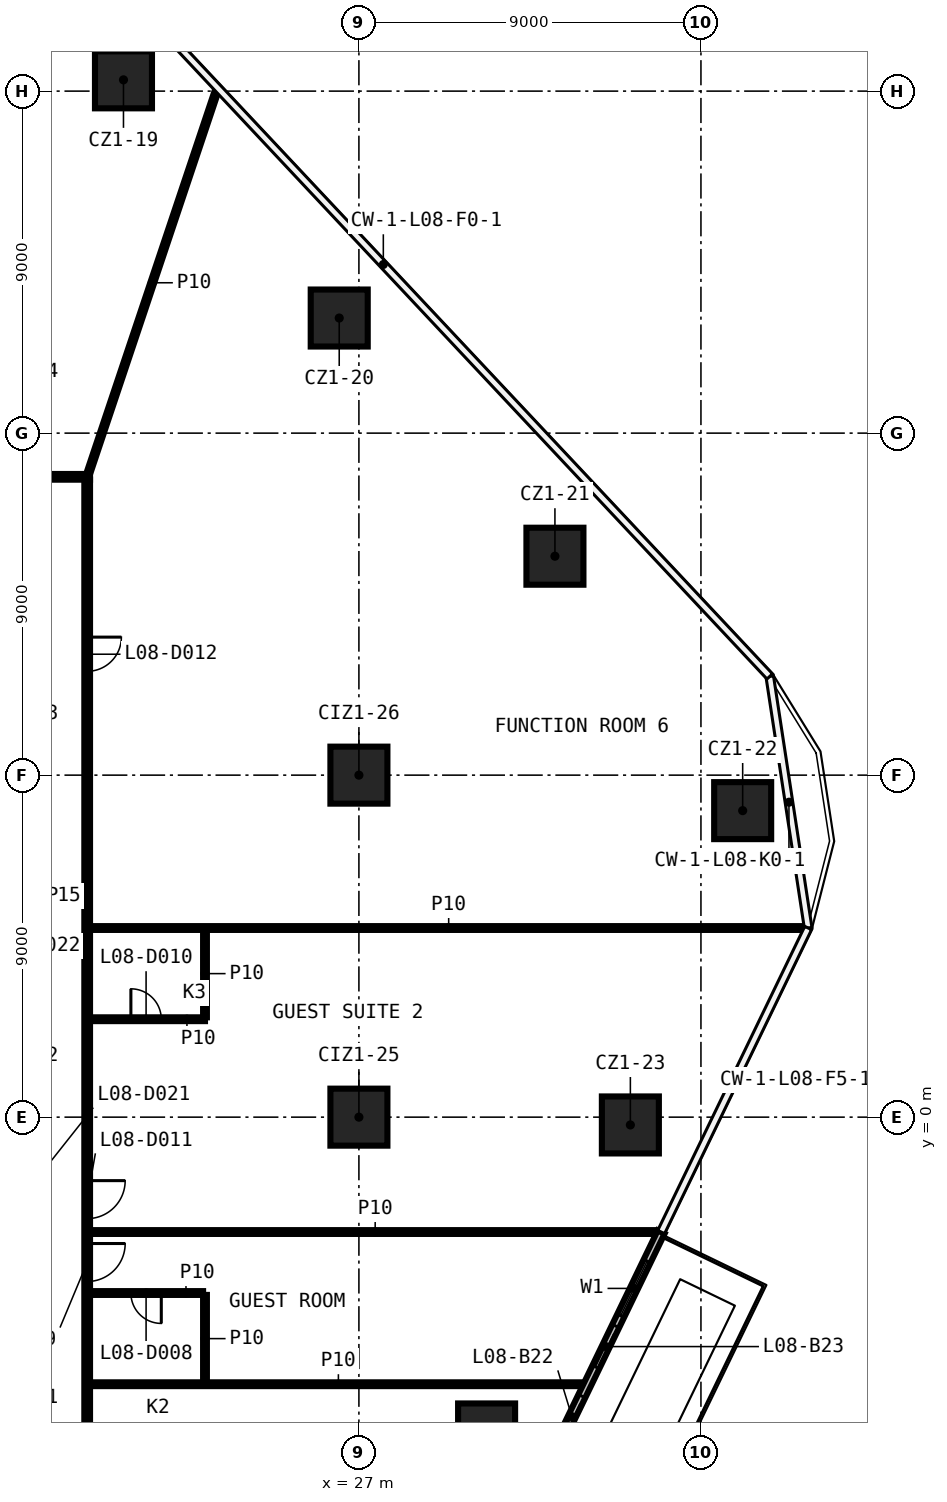
"""IFC4 building model, lengths in metres.
Left out: names, types, materials, properties, quantities, classifications, styles, units other than length and angle.
Written with IfcOpenShell. Run it as: python <this file> out.ifc"""

import sys

from ifc_helpers import new_model, si_unit, direction, frame, frame_2d, origin, origin_2d, place, context, subcontext, project, spatial, rectangle, extrude, element, fill, save


model = new_model("IFC4")
c1 = context("Model", 3, precision=1e-05, world=origin(), true_north=direction((0.0, 1.0)))
c2 = subcontext(c1, "Body", "Model", "MODEL_VIEW")
j1 = project(units=[si_unit("LENGTHUNIT", "METRE"), si_unit("PLANEANGLEUNIT", "RADIAN")], contexts=[c1])
p1 = place(None, origin())
s1 = spatial("IfcSite", under=j1, at=p1, CompositionType="ELEMENT")
p2 = place(p1, origin())
s2 = spatial("IfcBuilding", under=s1, at=p2, CompositionType="ELEMENT")
p3 = place(p2, frame((0.0, 0.0, 51.4)))
s3 = spatial("IfcBuildingStorey", under=s2, at=p3, CompositionType="ELEMENT", Elevation=51.4)
for number, where, z_axis, x_axis in (
    (1, (20.805, 27.297, 0.0), (0.0, 0.0, 1.0), (1.0, 0.0, 0.0)),
    (2, (26.482, 21.029, 0.0), (0.0, 0.0, 1.0), (1.0, 0.0, 0.0)),
    (3, (32.158, 14.761, 0.0), (0.0, 0.0, 1.0), (1.0, 0.0, 0.0)),
    (4, (37.098, 8.066, 0.0), (0.0, 0.0, 1.0), (1.0, 0.0, 0.0)),
    (5, (34.143, -0.205, 0.0), (0.0, 0.0, 1.0), (1.0, 0.0, 0.0)),
    (6, (30.36, -8.284, 0.0), (0.0, 0.0, 1.0), (1.0, 0.0, 0.0)),
    (7, (27.0, 0.0, 0.0), (0.0, 0.0, 1.0), (1.0, 0.0, 0.0)),
    (8, (27.0, 9.0, 0.0), (0.0, 0.0, 1.0), (1.0, 0.0, 0.0)),
):
    element("IfcColumn", number, at=place(p3, frame(where, z_axis=z_axis, x_axis=x_axis)), inside=s3, PredefinedType="COLUMN", context=c2, shape_type="SweptSolid", body=[
        extrude(rectangle(XDim=1.5, YDim=1.5, at=origin_2d()), origin(), (0.0, 0.0, 1.0), 3.3),
    ])
p4 = place(p3, frame((19.925, -7.028, 0.0), z_axis=(0.0, 0.0, 1.0), x_axis=(1.0, 0.0, 0.0)))
e9 = element("IfcWall", 9, at=p4, inside=s3, PredefinedType="PARTITIONING", context=c2, shape_type="SweptSolid", body=[
    extrude(rectangle(XDim=13.071, YDim=0.1, at=frame_2d((6.535, 0.0))), origin(), (0.0, 0.0, 1.0), 3.3),
])
p5 = place(p3, frame((22.9, -4.628, 0.0), z_axis=(0.0, 0.0, 1.0), x_axis=(-1.0, 0.0, 0.0)))
e10 = element("IfcWall", 10, at=p5, inside=s3, PredefinedType="PARTITIONING", context=c2, shape_type="SweptSolid", body=[
    extrude(rectangle(XDim=2.975, YDim=0.1, at=frame_2d((1.487, 0.0))), origin(), (0.0, 0.0, 1.0), 3.3),
])
p6 = place(p5, frame((1.1, 0.0, 0.0)))
e11 = element("IfcOpeningElement", 11, at=p6, cuts=e10, PredefinedType="OPENING", context=c2, shape_type="SweptSolid", body=[
    extrude(rectangle(XDim=0.8, YDim=2.1, at=frame_2d((0.4, 1.05))), frame((0.0, 0.06, 0.0), z_axis=(0.0, -1.0, 0.0), x_axis=(1.0, 0.0, 0.0)), (0.0, 0.0, 1.0), 0.12),
])
p7 = place(p3, frame((19.925, -3.023, 0.0), z_axis=(0.0, 0.0, 1.0), x_axis=(1.0, 0.0, 0.0)))
e12 = element("IfcWall", 12, at=p7, inside=s3, PredefinedType="PARTITIONING", context=c2, shape_type="SweptSolid", body=[
    extrude(rectangle(XDim=15.006, YDim=0.1, at=frame_2d((7.503, 0.0))), origin(), (0.0, 0.0, 1.0), 3.3),
])
p8 = place(p3, frame((19.925, 2.577, 0.0), z_axis=(0.0, 0.0, 1.0), x_axis=(1.0, 0.0, 0.0)))
e13 = element("IfcWall", 13, at=p8, inside=s3, PredefinedType="PARTITIONING", context=c2, shape_type="SweptSolid", body=[
    extrude(rectangle(XDim=3.025, YDim=0.1, at=frame_2d((1.512, 0.0))), origin(), (0.0, 0.0, 1.0), 3.3),
])
p9 = place(p8, frame((1.075, 0.0, 0.0)))
e14 = element("IfcOpeningElement", 14, at=p9, cuts=e13, PredefinedType="OPENING", context=c2, shape_type="SweptSolid", body=[
    extrude(rectangle(XDim=0.8, YDim=2.1, at=frame_2d((0.4, 1.05))), frame((0.0, 0.06, 0.0), z_axis=(0.0, -1.0, 0.0), x_axis=(1.0, 0.0, 0.0)), (0.0, 0.0, 1.0), 0.12),
])
p10 = place(p3, frame((19.925, 4.977, 0.0), z_axis=(0.0, 0.0, 1.0), x_axis=(1.0, 0.0, 0.0)))
e15 = element("IfcWall", 15, at=p10, inside=s3, PredefinedType="PARTITIONING", context=c2, shape_type="SweptSolid", body=[
    extrude(rectangle(XDim=18.874, YDim=0.1, at=frame_2d((9.437, 0.0))), origin(), (0.0, 0.0, 1.0), 3.3),
])
p11 = place(p3, frame((-19.925, 16.85, 0.0), z_axis=(0.0, 0.0, 1.0), x_axis=(1.0, 0.0, 0.0)))
e16 = element("IfcWall", 16, at=p11, inside=s3, PredefinedType="PARTITIONING", context=c2, shape_type="SweptSolid", body=[
    extrude(rectangle(XDim=39.85, YDim=0.15, at=frame_2d((19.925, 0.0))), origin(), (0.0, 0.0, 1.0), 3.3),
])
p12 = place(p11, frame((31.643, 0.0, 0.0)))
e17 = element("IfcOpeningElement", 17, at=p12, cuts=e16, PredefinedType="OPENING", context=c2, shape_type="SweptSolid", body=[
    extrude(rectangle(XDim=0.9, YDim=2.1, at=frame_2d((0.45, 1.05))), frame((0.0, 0.085, 0.0), z_axis=(0.0, -1.0, 0.0), x_axis=(1.0, 0.0, 0.0)), (0.0, 0.0, 1.0), 0.17),
])
p13 = place(p11, frame((22.056, 0.0, 0.0)))
e18 = element("IfcOpeningElement", 18, at=p13, cuts=e16, PredefinedType="OPENING", context=c2, shape_type="SweptSolid", body=[
    extrude(rectangle(XDim=0.9, YDim=2.1, at=frame_2d((0.45, 1.05))), frame((0.0, 0.085, 0.0), z_axis=(0.0, -1.0, 0.0), x_axis=(1.0, 0.0, 0.0)), (0.0, 0.0, 1.0), 0.17),
])
p14 = place(p11, frame((14.831, 0.0, 0.0)))
e19 = element("IfcOpeningElement", 19, at=p14, cuts=e16, PredefinedType="OPENING", context=c2, shape_type="SweptSolid", body=[
    extrude(rectangle(XDim=1.0, YDim=2.1, at=frame_2d((0.5, 1.05))), frame((0.0, 0.085, 0.0), z_axis=(0.0, -1.0, 0.0), x_axis=(1.0, 0.0, 0.0)), (0.0, 0.0, 1.0), 0.17),
])
p15 = place(p3, frame((19.85, 16.85, 0.0), z_axis=(0.0, 0.0, 1.0), x_axis=(0.317967659794, 0.948101559605, 0.0)))
e20 = element("IfcWall", 20, at=p15, inside=s3, PredefinedType="PARTITIONING", context=c2, shape_type="SweptSolid", body=[
    extrude(rectangle(XDim=10.773, YDim=0.1, at=frame_2d((5.387, 0.0))), origin(), (0.0, 0.0, 1.0), 3.3),
])
p16 = place(p3, frame((22.95, -6.978, 0.0), z_axis=(0.0, 0.0, 1.0), x_axis=(0.0, 1.0, 0.0)))
e21 = element("IfcWall", 21, at=p16, inside=s3, PredefinedType="PARTITIONING", context=c2, shape_type="SweptSolid", body=[
    extrude(rectangle(XDim=2.3, YDim=0.1, at=frame_2d((1.15, 0.0))), origin(), (0.0, 0.0, 1.0), 3.3),
])
p17 = place(p3, frame((22.95, 2.627, 0.0), z_axis=(0.0, 0.0, 1.0), x_axis=(0.0, 1.0, 0.0)))
e22 = element("IfcWall", 22, at=p17, inside=s3, PredefinedType="PARTITIONING", context=c2, shape_type="SweptSolid", body=[
    extrude(rectangle(XDim=2.3, YDim=0.1, at=frame_2d((1.15, 0.0))), origin(), (0.0, 0.0, 1.0), 3.3),
])
p18 = place(p3, frame((19.85, 16.775, 0.0), z_axis=(0.0, 0.0, 1.0), x_axis=(0.0, -1.0, 0.0)))
e23 = element("IfcWall", 23, at=p18, inside=s3, PredefinedType="PARTITIONING", context=c2, shape_type="SweptSolid", body=[
    extrude(rectangle(XDim=33.55, YDim=0.15, at=frame_2d((16.775, 0.0))), origin(), (0.0, 0.0, 1.0), 3.3),
])
p19 = place(p18, frame((29.016, 0.0, 0.0)))
e24 = element("IfcOpeningElement", 24, at=p19, cuts=e23, PredefinedType="OPENING", context=c2, shape_type="SweptSolid", body=[
    extrude(rectangle(XDim=1.0, YDim=2.1, at=frame_2d((0.5, 1.05))), frame((0.0, 0.085, 0.0), z_axis=(0.0, -1.0, 0.0), x_axis=(1.0, 0.0, 0.0)), (0.0, 0.0, 1.0), 0.17),
])
p20 = place(p18, frame((20.1, 0.0, 0.0)))
e25 = element("IfcOpeningElement", 25, at=p20, cuts=e23, PredefinedType="OPENING", context=c2, shape_type="SweptSolid", body=[
    extrude(rectangle(XDim=1.0, YDim=2.1, at=frame_2d((0.5, 1.05))), frame((0.0, 0.085, 0.0), z_axis=(0.0, -1.0, 0.0), x_axis=(1.0, 0.0, 0.0)), (0.0, 0.0, 1.0), 0.17),
])
p21 = place(p18, frame((18.446, 0.0, 0.0)))
e26 = element("IfcOpeningElement", 26, at=p21, cuts=e23, PredefinedType="OPENING", context=c2, shape_type="SweptSolid", body=[
    extrude(rectangle(XDim=1.0, YDim=2.1, at=frame_2d((0.5, 1.05))), frame((0.0, 0.085, 0.0), z_axis=(0.0, -1.0, 0.0), x_axis=(1.0, 0.0, 0.0)), (0.0, 0.0, 1.0), 0.17),
])
p22 = place(p18, frame((4.143, 0.0, 0.0)))
e27 = element("IfcOpeningElement", 27, at=p22, cuts=e23, PredefinedType="OPENING", context=c2, shape_type="SweptSolid", body=[
    extrude(rectangle(XDim=0.9, YDim=2.1, at=frame_2d((0.45, 1.05))), frame((0.0, 0.085, 0.0), z_axis=(0.0, -1.0, 0.0), x_axis=(1.0, 0.0, 0.0)), (0.0, 0.0, 1.0), 0.17),
])
p23 = place(p3, frame((23.338, -27.051, 0.0), z_axis=(0.0, 0.0, 1.0), x_axis=(0.43524886879, 0.900310181114, 0.0)))
e28 = element("IfcWall", 28, at=p23, inside=s3, PredefinedType="SOLIDWALL", context=c2, shape_type="SweptSolid", body=[
    extrude(rectangle(XDim=26.689, YDim=0.2, at=frame_2d((13.344, 0.0))), origin(), (0.0, 0.0, 1.0), 3.3),
])
p24 = place(p23, frame((0.5, 0.0, 0.6)))
e29 = element("IfcOpeningElement", 29, at=p24, cuts=e28, PredefinedType="OPENING", context=c2, shape_type="SweptSolid", body=[
    extrude(rectangle(XDim=1.6, YDim=2.4, at=frame_2d((0.8, 1.2))), frame((0.0, 0.11, 0.0), z_axis=(0.0, -1.0, 0.0), x_axis=(1.0, 0.0, 0.0)), (0.0, 0.0, 1.0), 0.22),
])
p25 = place(p23, frame((3.0, 0.0, 0.0)))
e30 = element("IfcOpeningElement", 30, at=p25, cuts=e28, PredefinedType="OPENING", context=c2, shape_type="SweptSolid", body=[
    extrude(rectangle(XDim=1.2, YDim=2.4, at=frame_2d((0.6, 1.2))), frame((0.0, 0.11, 0.0), z_axis=(0.0, -1.0, 0.0), x_axis=(1.0, 0.0, 0.0)), (0.0, 0.0, 1.0), 0.22),
])
p26 = place(p23, frame((6.448, 0.0, 0.6)))
e31 = element("IfcOpeningElement", 31, at=p26, cuts=e28, PredefinedType="OPENING", context=c2, shape_type="SweptSolid", body=[
    extrude(rectangle(XDim=1.6, YDim=2.4, at=frame_2d((0.8, 1.2))), frame((0.0, 0.11, 0.0), z_axis=(0.0, -1.0, 0.0), x_axis=(1.0, 0.0, 0.0)), (0.0, 0.0, 1.0), 0.22),
])
p27 = place(p23, frame((4.948, 0.0, 0.0)))
e32 = element("IfcOpeningElement", 32, at=p27, cuts=e28, PredefinedType="OPENING", context=c2, shape_type="SweptSolid", body=[
    extrude(rectangle(XDim=1.2, YDim=2.4, at=frame_2d((0.6, 1.2))), frame((0.0, 0.11, 0.0), z_axis=(0.0, -1.0, 0.0), x_axis=(1.0, 0.0, 0.0)), (0.0, 0.0, 1.0), 0.22),
])
p28 = place(p23, frame((9.396, 0.0, 0.6)))
e33 = element("IfcOpeningElement", 33, at=p28, cuts=e28, PredefinedType="OPENING", context=c2, shape_type="SweptSolid", body=[
    extrude(rectangle(XDim=1.6, YDim=2.4, at=frame_2d((0.8, 1.2))), frame((0.0, 0.11, 0.0), z_axis=(0.0, -1.0, 0.0), x_axis=(1.0, 0.0, 0.0)), (0.0, 0.0, 1.0), 0.22),
])
p29 = place(p23, frame((11.896, 0.0, 0.0)))
e34 = element("IfcOpeningElement", 34, at=p29, cuts=e28, PredefinedType="OPENING", context=c2, shape_type="SweptSolid", body=[
    extrude(rectangle(XDim=1.2, YDim=2.4, at=frame_2d((0.6, 1.2))), frame((0.0, 0.11, 0.0), z_axis=(0.0, -1.0, 0.0), x_axis=(1.0, 0.0, 0.0)), (0.0, 0.0, 1.0), 0.22),
])
p30 = place(p23, frame((15.344, 0.0, 0.6)))
e35 = element("IfcOpeningElement", 35, at=p30, cuts=e28, PredefinedType="OPENING", context=c2, shape_type="SweptSolid", body=[
    extrude(rectangle(XDim=1.6, YDim=2.4, at=frame_2d((0.8, 1.2))), frame((0.0, 0.11, 0.0), z_axis=(0.0, -1.0, 0.0), x_axis=(1.0, 0.0, 0.0)), (0.0, 0.0, 1.0), 0.22),
])
p31 = place(p23, frame((13.844, 0.0, 0.0)))
e36 = element("IfcOpeningElement", 36, at=p31, cuts=e28, PredefinedType="OPENING", context=c2, shape_type="SweptSolid", body=[
    extrude(rectangle(XDim=1.2, YDim=2.4, at=frame_2d((0.6, 1.2))), frame((0.0, 0.11, 0.0), z_axis=(0.0, -1.0, 0.0), x_axis=(1.0, 0.0, 0.0)), (0.0, 0.0, 1.0), 0.22),
])
p32 = place(p23, frame((18.292, 0.0, 0.6)))
e37 = element("IfcOpeningElement", 37, at=p32, cuts=e28, PredefinedType="OPENING", context=c2, shape_type="SweptSolid", body=[
    extrude(rectangle(XDim=1.6, YDim=2.4, at=frame_2d((0.8, 1.2))), frame((0.0, 0.11, 0.0), z_axis=(0.0, -1.0, 0.0), x_axis=(1.0, 0.0, 0.0)), (0.0, 0.0, 1.0), 0.22),
])
p33 = place(p23, frame((20.692, 0.0, 0.0)))
e38 = element("IfcOpeningElement", 38, at=p33, cuts=e28, PredefinedType="OPENING", context=c2, shape_type="SweptSolid", body=[
    extrude(rectangle(XDim=1.2, YDim=2.4, at=frame_2d((0.6, 1.2))), frame((0.0, 0.11, 0.0), z_axis=(0.0, -1.0, 0.0), x_axis=(1.0, 0.0, 0.0)), (0.0, 0.0, 1.0), 0.22),
])
p34 = place(p23, frame((24.24, 0.0, 0.6)))
e39 = element("IfcOpeningElement", 39, at=p34, cuts=e28, PredefinedType="OPENING", context=c2, shape_type="SweptSolid", body=[
    extrude(rectangle(XDim=1.6, YDim=2.4, at=frame_2d((0.8, 1.2))), frame((0.0, 0.11, 0.0), z_axis=(0.0, -1.0, 0.0), x_axis=(1.0, 0.0, 0.0)), (0.0, 0.0, 1.0), 0.22),
])
p35 = place(p23, frame((22.74, 0.0, 0.0)))
e40 = element("IfcOpeningElement", 40, at=p35, cuts=e28, PredefinedType="OPENING", context=c2, shape_type="SweptSolid", body=[
    extrude(rectangle(XDim=1.2, YDim=2.4, at=frame_2d((0.6, 1.2))), frame((0.0, 0.11, 0.0), z_axis=(0.0, -1.0, 0.0), x_axis=(1.0, 0.0, 0.0)), (0.0, 0.0, 1.0), 0.22),
])
p36 = place(p6, origin())
e41 = element("IfcDoor", 41, at=p36, inside=s3, OperationType="SINGLE_SWING_LEFT", PredefinedType="DOOR", context=c2, shape_type="SweptSolid", body=[
    extrude(rectangle(XDim=0.8, YDim=2.1, at=frame_2d((0.4, 1.05))), frame((0.0, 0.025, 0.0), z_axis=(0.0, -1.0, 0.0), x_axis=(1.0, 0.0, 0.0)), (0.0, 0.0, 1.0), 0.05),
])
fill(e11, e41)
p37 = place(p20, origin())
e42 = element("IfcDoor", 42, at=p37, inside=s3, OperationType="SINGLE_SWING_RIGHT", PredefinedType="DOOR", context=c2, shape_type="SweptSolid", body=[
    extrude(rectangle(XDim=1.0, YDim=2.1, at=frame_2d((0.5, 1.05))), frame((0.0, 0.025, 0.0), z_axis=(0.0, -1.0, 0.0), x_axis=(1.0, 0.0, 0.0)), (0.0, 0.0, 1.0), 0.05),
])
fill(e25, e42)
p38 = place(p9, origin())
e43 = element("IfcDoor", 43, at=p38, inside=s3, OperationType="SINGLE_SWING_RIGHT", PredefinedType="DOOR", context=c2, shape_type="SweptSolid", body=[
    extrude(rectangle(XDim=0.8, YDim=2.1, at=frame_2d((0.4, 1.05))), frame((0.0, 0.025, 0.0), z_axis=(0.0, -1.0, 0.0), x_axis=(1.0, 0.0, 0.0)), (0.0, 0.0, 1.0), 0.05),
])
fill(e14, e43)
p39 = place(p21, origin())
e44 = element("IfcDoor", 44, at=p39, inside=s3, OperationType="SINGLE_SWING_LEFT", PredefinedType="DOOR", context=c2, shape_type="SweptSolid", body=[
    extrude(rectangle(XDim=1.0, YDim=2.1, at=frame_2d((0.5, 1.05))), frame((0.0, 0.025, 0.0), z_axis=(0.0, -1.0, 0.0), x_axis=(1.0, 0.0, 0.0)), (0.0, 0.0, 1.0), 0.05),
])
fill(e26, e44)
p40 = place(p22, origin())
e45 = element("IfcDoor", 45, at=p40, inside=s3, OperationType="SINGLE_SWING_RIGHT", PredefinedType="DOOR", context=c2, shape_type="SweptSolid", body=[
    extrude(rectangle(XDim=0.9, YDim=2.1, at=frame_2d((0.45, 1.05))), frame((0.0, 0.025, 0.0), z_axis=(0.0, -1.0, 0.0), x_axis=(1.0, 0.0, 0.0)), (0.0, 0.0, 1.0), 0.05),
])
fill(e27, e45)
p41 = place(p33, origin())
e46 = element("IfcDoor", 46, at=p41, inside=s3, OperationType="SLIDING_TO_LEFT", PredefinedType="DOOR", context=c2, shape_type="SweptSolid", body=[
    extrude(rectangle(XDim=1.2, YDim=2.4, at=frame_2d((0.6, 1.2))), frame((0.0, 0.025, 0.0), z_axis=(0.0, -1.0, 0.0), x_axis=(1.0, 0.0, 0.0)), (0.0, 0.0, 1.0), 0.05),
])
fill(e38, e46)
p42 = place(p34, origin())
e47 = element("IfcWindow", 47, at=p42, inside=s3, PartitioningType="SINGLE_PANEL", PredefinedType="WINDOW", context=c2, shape_type="SweptSolid", body=[
    extrude(rectangle(XDim=1.6, YDim=2.4, at=frame_2d((0.8, 1.2))), frame((0.0, 0.03, 0.0), z_axis=(0.0, -1.0, 0.0), x_axis=(1.0, 0.0, 0.0)), (0.0, 0.0, 1.0), 0.06),
])
fill(e39, e47)
p43 = place(p35, origin())
e48 = element("IfcDoor", 48, at=p43, inside=s3, OperationType="SLIDING_TO_LEFT", PredefinedType="DOOR", context=c2, shape_type="SweptSolid", body=[
    extrude(rectangle(XDim=1.2, YDim=2.4, at=frame_2d((0.6, 1.2))), frame((0.0, 0.025, 0.0), z_axis=(0.0, -1.0, 0.0), x_axis=(1.0, 0.0, 0.0)), (0.0, 0.0, 1.0), 0.05),
])
fill(e40, e48)
save(model, sys.argv[1])
